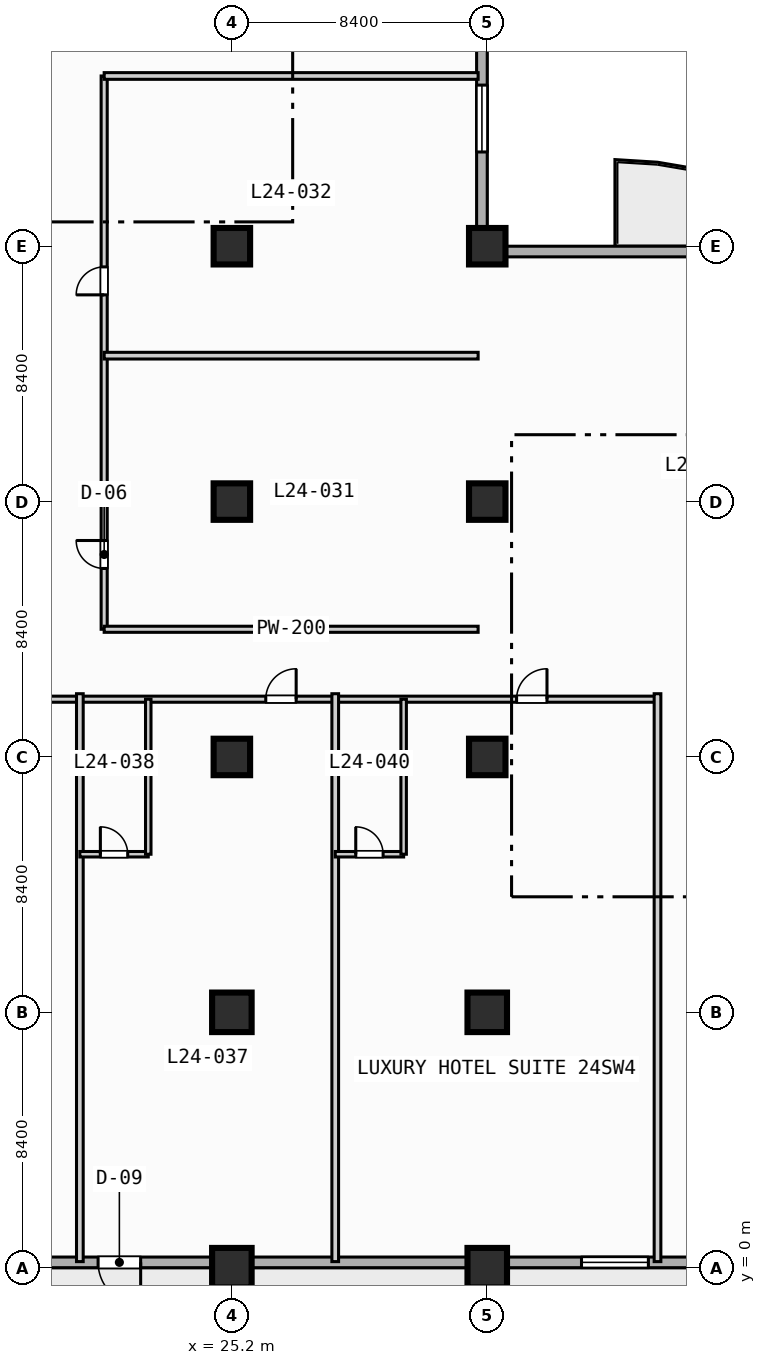
"""IFC4 building model, lengths in metres.
Left out: names, types, materials, properties, quantities, classifications, styles, units other than length and angle.
Written with IfcOpenShell. Run it as: python <this file> out.ifc"""

import sys

from ifc_helpers import new_model, si_unit, direction, frame, frame_2d, origin, origin_2d, place, context, subcontext, project, spatial, rectangle, extrude, element, fill, save


model = new_model("IFC4")
c1 = context("Model", 3, precision=1e-05, world=origin(), true_north=direction((0.0, 1.0)))
c2 = subcontext(c1, "Body", "Model", "MODEL_VIEW")
j1 = project(units=[si_unit("LENGTHUNIT", "METRE"), si_unit("PLANEANGLEUNIT", "RADIAN")], contexts=[c1])
p1 = place(None, origin())
s1 = spatial("IfcSite", under=j1, at=p1, CompositionType="ELEMENT")
p2 = place(p1, origin())
s2 = spatial("IfcBuilding", under=s1, at=p2, CompositionType="ELEMENT")
p3 = place(p2, frame((0.0, 0.0, 103.8)))
s3 = spatial("IfcBuildingStorey", under=s2, at=p3, CompositionType="ELEMENT", Elevation=103.8)
for number, where, z_axis, x_axis in (
    (1, (25.2, 0.0, 0.0), (0.0, 0.0, 1.0), (1.0, 0.0, 0.0)),
    (2, (25.2, 8.4, 0.0), (0.0, 0.0, 1.0), (1.0, 0.0, 0.0)),
):
    element("IfcColumn", number, at=place(p3, frame(where, z_axis=z_axis, x_axis=x_axis)), inside=s3, PredefinedType="COLUMN", context=c2, shape_type="SweptSolid", body=[
        extrude(rectangle(XDim=1.3, YDim=1.3, at=origin_2d()), origin(), (0.0, 0.0, 1.0), 3.8),
    ])
for number, where, z_axis, x_axis in (
    (3, (25.2, 16.8, 0.0), (0.0, 0.0, 1.0), (1.0, 0.0, 0.0)),
    (4, (25.2, 25.2, 0.0), (0.0, 0.0, 1.0), (1.0, 0.0, 0.0)),
    (5, (25.2, 33.6, 0.0), (0.0, 0.0, 1.0), (1.0, 0.0, 0.0)),
):
    element("IfcColumn", number, at=place(p3, frame(where, z_axis=z_axis, x_axis=x_axis)), inside=s3, PredefinedType="COLUMN", context=c2, shape_type="SweptSolid", body=[
        extrude(rectangle(XDim=1.2, YDim=1.2, at=origin_2d()), origin(), (0.0, 0.0, 1.0), 3.8),
    ])
for number, where, z_axis, x_axis in (
    (6, (33.6, 0.0, 0.0), (0.0, 0.0, 1.0), (1.0, 0.0, 0.0)),
    (7, (33.6, 8.4, 0.0), (0.0, 0.0, 1.0), (1.0, 0.0, 0.0)),
):
    element("IfcColumn", number, at=place(p3, frame(where, z_axis=z_axis, x_axis=x_axis)), inside=s3, PredefinedType="COLUMN", context=c2, shape_type="SweptSolid", body=[
        extrude(rectangle(XDim=1.3, YDim=1.3, at=origin_2d()), origin(), (0.0, 0.0, 1.0), 3.8),
    ])
for number, where, z_axis, x_axis in (
    (8, (33.6, 16.8, 0.0), (0.0, 0.0, 1.0), (1.0, 0.0, 0.0)),
    (9, (33.6, 25.2, 0.0), (0.0, 0.0, 1.0), (1.0, 0.0, 0.0)),
    (10, (33.6, 33.6, 0.0), (0.0, 0.0, 1.0), (1.0, 0.0, 0.0)),
):
    element("IfcColumn", number, at=place(p3, frame(where, z_axis=z_axis, x_axis=x_axis)), inside=s3, PredefinedType="COLUMN", context=c2, shape_type="SweptSolid", body=[
        extrude(rectangle(XDim=1.2, YDim=1.2, at=origin_2d()), origin(), (0.0, 0.0, 1.0), 3.8),
    ])
p4 = place(p3, frame((33.425, 89.225, 0.0), z_axis=(0.0, 0.0, 1.0), x_axis=(0.0, -1.0, 0.0)))
e11 = element("IfcWall", 11, at=p4, inside=s3, PredefinedType="STANDARD", context=c2, shape_type="SweptSolid", body=[
    extrude(rectangle(XDim=55.8, YDim=0.35, at=frame_2d((27.9, 0.0))), origin(), (0.0, 0.0, 1.0), 3.55),
])
p5 = place(p4, frame((50.325, 0.0, 0.85)))
e12 = element("IfcOpeningElement", 12, at=p5, cuts=e11, PredefinedType="OPENING", context=c2, shape_type="SweptSolid", body=[
    extrude(rectangle(XDim=2.2, YDim=1.8, at=frame_2d((1.1, 0.9))), frame((0.0, 0.185, 0.0), z_axis=(0.0, -1.0, 0.0), x_axis=(1.0, 0.0, 0.0)), (0.0, 0.0, 1.0), 0.37),
])
p6 = place(p4, frame((33.525, 0.0, 0.85)))
e13 = element("IfcOpeningElement", 13, at=p6, cuts=e11, PredefinedType="OPENING", context=c2, shape_type="SweptSolid", body=[
    extrude(rectangle(XDim=2.2, YDim=1.8, at=frame_2d((1.1, 0.9))), frame((0.0, 0.185, 0.0), z_axis=(0.0, -1.0, 0.0), x_axis=(1.0, 0.0, 0.0)), (0.0, 0.0, 1.0), 0.37),
])
p7 = place(p4, frame((25.125, 0.0, 0.85)))
e14 = element("IfcOpeningElement", 14, at=p7, cuts=e11, PredefinedType="OPENING", context=c2, shape_type="SweptSolid", body=[
    extrude(rectangle(XDim=2.2, YDim=1.8, at=frame_2d((1.1, 0.9))), frame((0.0, 0.185, 0.0), z_axis=(0.0, -1.0, 0.0), x_axis=(1.0, 0.0, 0.0)), (0.0, 0.0, 1.0), 0.37),
])
p8 = place(p4, frame((16.725, 0.0, 0.85)))
e15 = element("IfcOpeningElement", 15, at=p8, cuts=e11, PredefinedType="OPENING", context=c2, shape_type="SweptSolid", body=[
    extrude(rectangle(XDim=2.2, YDim=1.8, at=frame_2d((1.1, 0.9))), frame((0.0, 0.185, 0.0), z_axis=(0.0, -1.0, 0.0), x_axis=(1.0, 0.0, 0.0)), (0.0, 0.0, 1.0), 0.37),
])
p9 = place(p4, frame((8.325, 0.0, 0.85)))
e16 = element("IfcOpeningElement", 16, at=p9, cuts=e11, PredefinedType="OPENING", context=c2, shape_type="SweptSolid", body=[
    extrude(rectangle(XDim=2.2, YDim=1.8, at=frame_2d((1.1, 0.9))), frame((0.0, 0.185, 0.0), z_axis=(0.0, -1.0, 0.0), x_axis=(1.0, 0.0, 0.0)), (0.0, 0.0, 1.0), 0.37),
])
p10 = place(p3, frame((33.425, 33.425, 0.0), z_axis=(0.0, 0.0, 1.0), x_axis=(1.0, 0.0, 0.0)))
e17 = element("IfcWall", 17, at=p10, inside=s3, PredefinedType="STANDARD", context=c2, shape_type="SweptSolid", body=[
    extrude(rectangle(XDim=39.0, YDim=0.35, at=frame_2d((19.5, 0.0))), origin(), (0.0, 0.0, 1.0), 3.55),
])
p11 = place(p10, frame((12.075, 0.0, 0.0)))
e18 = element("IfcOpeningElement", 18, at=p11, cuts=e17, PredefinedType="OPENING", context=c2, shape_type="SweptSolid", body=[
    extrude(rectangle(XDim=1.4, YDim=2.2, at=frame_2d((0.7, 1.1))), frame((0.0, 0.185, 0.0), z_axis=(0.0, -1.0, 0.0), x_axis=(1.0, 0.0, 0.0)), (0.0, 0.0, 1.0), 0.37),
])
p12 = place(p10, frame((20.075, 0.0, 0.85)))
e19 = element("IfcOpeningElement", 19, at=p12, cuts=e17, PredefinedType="OPENING", context=c2, shape_type="SweptSolid", body=[
    extrude(rectangle(XDim=2.2, YDim=1.8, at=frame_2d((1.1, 0.9))), frame((0.0, 0.185, 0.0), z_axis=(0.0, -1.0, 0.0), x_axis=(1.0, 0.0, 0.0)), (0.0, 0.0, 1.0), 0.37),
])
p13 = place(p10, frame((28.475, 0.0, 0.85)))
e20 = element("IfcOpeningElement", 20, at=p13, cuts=e17, PredefinedType="OPENING", context=c2, shape_type="SweptSolid", body=[
    extrude(rectangle(XDim=2.2, YDim=1.8, at=frame_2d((1.1, 0.9))), frame((0.0, 0.185, 0.0), z_axis=(0.0, -1.0, 0.0), x_axis=(1.0, 0.0, 0.0)), (0.0, 0.0, 1.0), 0.37),
])
p14 = place(p3, frame((72.425, 0.175, 0.0), z_axis=(0.0, 0.0, 1.0), x_axis=(-1.0, 0.0, 0.0)))
e21 = element("IfcWall", 21, at=p14, inside=s3, PredefinedType="STANDARD", context=c2, shape_type="SweptSolid", body=[
    extrude(rectangle(XDim=69.25, YDim=0.35, at=frame_2d((34.625, 0.0))), origin(), (0.0, 0.0, 1.0), 3.55),
])
p15 = place(p14, frame((50.225, 0.0, 0.0)))
e22 = element("IfcOpeningElement", 22, at=p15, cuts=e21, PredefinedType="OPENING", context=c2, shape_type="SweptSolid", body=[
    extrude(rectangle(XDim=1.4, YDim=2.2, at=frame_2d((0.7, 1.1))), frame((0.0, 0.185, 0.0), z_axis=(0.0, -1.0, 0.0), x_axis=(1.0, 0.0, 0.0)), (0.0, 0.0, 1.0), 0.37),
])
p16 = place(p14, frame((33.525, 0.0, 0.85)))
e23 = element("IfcOpeningElement", 23, at=p16, cuts=e21, PredefinedType="OPENING", context=c2, shape_type="SweptSolid", body=[
    extrude(rectangle(XDim=2.2, YDim=1.8, at=frame_2d((1.1, 0.9))), frame((0.0, 0.185, 0.0), z_axis=(0.0, -1.0, 0.0), x_axis=(1.0, 0.0, 0.0)), (0.0, 0.0, 1.0), 0.37),
])
p17 = place(p14, frame((25.125, 0.0, 0.85)))
e24 = element("IfcOpeningElement", 24, at=p17, cuts=e21, PredefinedType="OPENING", context=c2, shape_type="SweptSolid", body=[
    extrude(rectangle(XDim=2.2, YDim=1.8, at=frame_2d((1.1, 0.9))), frame((0.0, 0.185, 0.0), z_axis=(0.0, -1.0, 0.0), x_axis=(1.0, 0.0, 0.0)), (0.0, 0.0, 1.0), 0.37),
])
p18 = place(p14, frame((8.325, 0.0, 0.85)))
e25 = element("IfcOpeningElement", 25, at=p18, cuts=e21, PredefinedType="OPENING", context=c2, shape_type="SweptSolid", body=[
    extrude(rectangle(XDim=2.2, YDim=1.8, at=frame_2d((1.1, 0.9))), frame((0.0, 0.185, 0.0), z_axis=(0.0, -1.0, 0.0), x_axis=(1.0, 0.0, 0.0)), (0.0, 0.0, 1.0), 0.37),
])
p19 = place(p14, frame((64.925, 0.0, 0.85)))
e26 = element("IfcOpeningElement", 26, at=p19, cuts=e21, PredefinedType="OPENING", context=c2, shape_type="SweptSolid", body=[
    extrude(rectangle(XDim=1.8, YDim=1.8, at=frame_2d((0.9, 0.9))), frame((0.0, 0.185, 0.0), z_axis=(0.0, -1.0, 0.0), x_axis=(1.0, 0.0, 0.0)), (0.0, 0.0, 1.0), 0.37),
])
p20 = place(p14, frame((56.525, 0.0, 0.85)))
e27 = element("IfcOpeningElement", 27, at=p20, cuts=e21, PredefinedType="OPENING", context=c2, shape_type="SweptSolid", body=[
    extrude(rectangle(XDim=1.8, YDim=1.8, at=frame_2d((0.9, 0.9))), frame((0.0, 0.185, 0.0), z_axis=(0.0, -1.0, 0.0), x_axis=(1.0, 0.0, 0.0)), (0.0, 0.0, 1.0), 0.37),
])
p21 = place(p14, frame((2.125, 0.0, 0.85)))
e28 = element("IfcOpeningElement", 28, at=p21, cuts=e21, PredefinedType="OPENING", context=c2, shape_type="SweptSolid", body=[
    extrude(rectangle(XDim=1.8, YDim=1.8, at=frame_2d((0.9, 0.9))), frame((0.0, 0.185, 0.0), z_axis=(0.0, -1.0, 0.0), x_axis=(1.0, 0.0, 0.0)), (0.0, 0.0, 1.0), 0.37),
])
p22 = place(p3, frame((21.0, 21.0, 0.0), z_axis=(0.0, 0.0, 1.0), x_axis=(0.0, 1.0, 0.0)))
e29 = element("IfcWall", 29, at=p22, inside=s3, PredefinedType="PARTITIONING", context=c2, shape_type="SweptSolid", body=[
    extrude(rectangle(XDim=18.2, YDim=0.2, at=frame_2d((9.1, 0.0))), origin(), (0.0, 0.0, 1.0), 3.55),
])
p23 = place(p22, frame((2.0, 0.0, 0.0)))
e30 = element("IfcOpeningElement", 30, at=p23, cuts=e29, PredefinedType="OPENING", context=c2, shape_type="SweptSolid", body=[
    extrude(rectangle(XDim=0.92, YDim=2.1, at=frame_2d((0.46, 1.05))), frame((0.0, 0.11, 0.0), z_axis=(0.0, -1.0, 0.0), x_axis=(1.0, 0.0, 0.0)), (0.0, 0.0, 1.0), 0.22),
])
p24 = place(p22, frame((11.0, 0.0, 0.0)))
e31 = element("IfcOpeningElement", 31, at=p24, cuts=e29, PredefinedType="OPENING", context=c2, shape_type="SweptSolid", body=[
    extrude(rectangle(XDim=0.92, YDim=2.1, at=frame_2d((0.46, 1.05))), frame((0.0, 0.11, 0.0), z_axis=(0.0, -1.0, 0.0), x_axis=(1.0, 0.0, 0.0)), (0.0, 0.0, 1.0), 0.22),
])
p25 = place(p3, frame((21.0, 21.0, 0.0), z_axis=(0.0, 0.0, 1.0), x_axis=(1.0, 0.0, 0.0)))
e32 = element("IfcWall", 32, at=p25, inside=s3, PredefinedType="PARTITIONING", context=c2, shape_type="SweptSolid", body=[
    extrude(rectangle(XDim=12.3, YDim=0.2, at=frame_2d((6.15, 0.0))), origin(), (0.0, 0.0, 1.0), 3.55),
])
for number, where, z_axis, x_axis in (
    (33, (21.0, 30.0, 0.0), (0.0, 0.0, 1.0), (1.0, 0.0, 0.0)),
    (34, (21.0, 39.2, 0.0), (0.0, 0.0, 1.0), (1.0, 0.0, 0.0)),
):
    element("IfcWall", number, at=place(p3, frame(where, z_axis=z_axis, x_axis=x_axis)), inside=s3, PredefinedType="PARTITIONING", context=c2, shape_type="SweptSolid", body=[
        extrude(rectangle(XDim=12.3, YDim=0.22, at=frame_2d((6.15, 0.0))), origin(), (0.0, 0.0, 1.0), 3.55),
    ])
p26 = place(p3, frame((3.4, 18.7, 0.0), z_axis=(0.0, 0.0, 1.0), x_axis=(1.0, 0.0, 0.0)))
e35 = element("IfcWall", 35, at=p26, inside=s3, PredefinedType="PARTITIONING", context=c2, shape_type="SweptSolid", body=[
    extrude(rectangle(XDim=35.8, YDim=0.2, at=frame_2d((17.9, 0.0))), origin(), (0.0, 0.0, 1.0), 3.55),
])
p27 = place(p26, frame((6.115, 0.0, 0.0)))
e36 = element("IfcOpeningElement", 36, at=p27, cuts=e35, PredefinedType="OPENING", context=c2, shape_type="SweptSolid", body=[
    extrude(rectangle(XDim=1.0, YDim=2.15, at=frame_2d((0.5, 1.075))), frame((0.0, 0.11, 0.0), z_axis=(0.0, -1.0, 0.0), x_axis=(1.0, 0.0, 0.0)), (0.0, 0.0, 1.0), 0.22),
])
p28 = place(p26, frame((14.515, 0.0, 0.0)))
e37 = element("IfcOpeningElement", 37, at=p28, cuts=e35, PredefinedType="OPENING", context=c2, shape_type="SweptSolid", body=[
    extrude(rectangle(XDim=1.0, YDim=2.15, at=frame_2d((0.5, 1.075))), frame((0.0, 0.11, 0.0), z_axis=(0.0, -1.0, 0.0), x_axis=(1.0, 0.0, 0.0)), (0.0, 0.0, 1.0), 0.22),
])
p29 = place(p26, frame((22.915, 0.0, 0.0)))
e38 = element("IfcOpeningElement", 38, at=p29, cuts=e35, PredefinedType="OPENING", context=c2, shape_type="SweptSolid", body=[
    extrude(rectangle(XDim=1.0, YDim=2.15, at=frame_2d((0.5, 1.075))), frame((0.0, 0.11, 0.0), z_axis=(0.0, -1.0, 0.0), x_axis=(1.0, 0.0, 0.0)), (0.0, 0.0, 1.0), 0.22),
])
p30 = place(p26, frame((31.165, 0.0, 0.0)))
e39 = element("IfcOpeningElement", 39, at=p30, cuts=e35, PredefinedType="OPENING", context=c2, shape_type="SweptSolid", body=[
    extrude(rectangle(XDim=1.0, YDim=2.15, at=frame_2d((0.5, 1.075))), frame((0.0, 0.11, 0.0), z_axis=(0.0, -1.0, 0.0), x_axis=(1.0, 0.0, 0.0)), (0.0, 0.0, 1.0), 0.22),
])
p31 = place(p3, frame((20.2, 0.2, 0.0), z_axis=(0.0, 0.0, 1.0), x_axis=(0.0, 1.0, 0.0)))
e40 = element("IfcWall", 40, at=p31, inside=s3, PredefinedType="PARTITIONING", context=c2, shape_type="SweptSolid", body=[
    extrude(rectangle(XDim=18.68, YDim=0.22, at=frame_2d((9.34, 0.0))), origin(), (0.0, 0.0, 1.0), 3.55),
])
p32 = place(p3, frame((20.2, 13.6, 0.0), z_axis=(0.0, 0.0, 1.0), x_axis=(1.0, 0.0, 0.0)))
e41 = element("IfcWall", 41, at=p32, inside=s3, PredefinedType="PLUMBINGWALL", context=c2, shape_type="SweptSolid", body=[
    extrude(rectangle(XDim=2.25, YDim=0.18, at=frame_2d((1.125, 0.0))), origin(), (0.0, 0.0, 1.0), 3.55),
])
p33 = place(p32, frame((0.675, 0.0, 0.0)))
e42 = element("IfcOpeningElement", 42, at=p33, cuts=e41, PredefinedType="OPENING", context=c2, shape_type="SweptSolid", body=[
    extrude(rectangle(XDim=0.9, YDim=2.1, at=frame_2d((0.45, 1.05))), frame((0.0, 0.1, 0.0), z_axis=(0.0, -1.0, 0.0), x_axis=(1.0, 0.0, 0.0)), (0.0, 0.0, 1.0), 0.2),
])
p34 = place(p3, frame((22.45, 13.6, 0.0), z_axis=(0.0, 0.0, 1.0), x_axis=(0.0, 1.0, 0.0)))
e43 = element("IfcWall", 43, at=p34, inside=s3, PredefinedType="PLUMBINGWALL", context=c2, shape_type="SweptSolid", body=[
    extrude(rectangle(XDim=5.1, YDim=0.18, at=frame_2d((2.55, 0.0))), origin(), (0.0, 0.0, 1.0), 3.55),
])
for number, where, z_axis, x_axis in (
    (44, (28.6, 0.2, 0.0), (0.0, 0.0, 1.0), (0.0, 1.0, 0.0)),
    (45, (39.2, 0.2, 0.0), (0.0, 0.0, 1.0), (0.0, 1.0, 0.0)),
):
    element("IfcWall", number, at=place(p3, frame(where, z_axis=z_axis, x_axis=x_axis)), inside=s3, PredefinedType="PARTITIONING", context=c2, shape_type="SweptSolid", body=[
        extrude(rectangle(XDim=18.68, YDim=0.22, at=frame_2d((9.34, 0.0))), origin(), (0.0, 0.0, 1.0), 3.55),
    ])
p35 = place(p3, frame((28.6, 13.6, 0.0), z_axis=(0.0, 0.0, 1.0), x_axis=(1.0, 0.0, 0.0)))
e46 = element("IfcWall", 46, at=p35, inside=s3, PredefinedType="PLUMBINGWALL", context=c2, shape_type="SweptSolid", body=[
    extrude(rectangle(XDim=2.25, YDim=0.18, at=frame_2d((1.125, 0.0))), origin(), (0.0, 0.0, 1.0), 3.55),
])
p36 = place(p35, frame((0.675, 0.0, 0.0)))
e47 = element("IfcOpeningElement", 47, at=p36, cuts=e46, PredefinedType="OPENING", context=c2, shape_type="SweptSolid", body=[
    extrude(rectangle(XDim=0.9, YDim=2.1, at=frame_2d((0.45, 1.05))), frame((0.0, 0.1, 0.0), z_axis=(0.0, -1.0, 0.0), x_axis=(1.0, 0.0, 0.0)), (0.0, 0.0, 1.0), 0.2),
])
p37 = place(p3, frame((30.85, 13.6, 0.0), z_axis=(0.0, 0.0, 1.0), x_axis=(0.0, 1.0, 0.0)))
e48 = element("IfcWall", 48, at=p37, inside=s3, PredefinedType="PLUMBINGWALL", context=c2, shape_type="SweptSolid", body=[
    extrude(rectangle(XDim=5.1, YDim=0.18, at=frame_2d((2.55, 0.0))), origin(), (0.0, 0.0, 1.0), 3.55),
])
p38 = place(p5, origin())
e49 = element("IfcWindow", 49, at=p38, inside=s3, PartitioningType="SINGLE_PANEL", PredefinedType="WINDOW", context=c2, shape_type="SweptSolid", body=[
    extrude(rectangle(XDim=2.2, YDim=1.8, at=frame_2d((1.1, 0.9))), frame((0.0, 0.03, 0.0), z_axis=(0.0, -1.0, 0.0), x_axis=(1.0, 0.0, 0.0)), (0.0, 0.0, 1.0), 0.06),
])
fill(e12, e49)
p39 = place(p15, origin())
e50 = element("IfcDoor", 50, at=p39, inside=s3, OperationType="SINGLE_SWING_LEFT", PredefinedType="DOOR", context=c2, shape_type="SweptSolid", body=[
    extrude(rectangle(XDim=1.4, YDim=2.2, at=frame_2d((0.7, 1.1))), frame((0.0, 0.025, 0.0), z_axis=(0.0, -1.0, 0.0), x_axis=(1.0, 0.0, 0.0)), (0.0, 0.0, 1.0), 0.05),
])
fill(e22, e50)
p40 = place(p16, origin())
e51 = element("IfcWindow", 51, at=p40, inside=s3, PartitioningType="SINGLE_PANEL", PredefinedType="WINDOW", context=c2, shape_type="SweptSolid", body=[
    extrude(rectangle(XDim=2.2, YDim=1.8, at=frame_2d((1.1, 0.9))), frame((0.0, 0.03, 0.0), z_axis=(0.0, -1.0, 0.0), x_axis=(1.0, 0.0, 0.0)), (0.0, 0.0, 1.0), 0.06),
])
fill(e23, e51)
p41 = place(p23, origin())
e52 = element("IfcDoor", 52, at=p41, inside=s3, OperationType="SINGLE_SWING_RIGHT", PredefinedType="DOOR", context=c2, shape_type="SweptSolid", body=[
    extrude(rectangle(XDim=0.92, YDim=2.1, at=frame_2d((0.46, 1.05))), frame((0.0, 0.025, 0.0), z_axis=(0.0, -1.0, 0.0), x_axis=(1.0, 0.0, 0.0)), (0.0, 0.0, 1.0), 0.05),
])
fill(e30, e52)
p42 = place(p24, origin())
e53 = element("IfcDoor", 53, at=p42, inside=s3, OperationType="SINGLE_SWING_LEFT", PredefinedType="DOOR", context=c2, shape_type="SweptSolid", body=[
    extrude(rectangle(XDim=0.92, YDim=2.1, at=frame_2d((0.46, 1.05))), frame((0.0, 0.025, 0.0), z_axis=(0.0, -1.0, 0.0), x_axis=(1.0, 0.0, 0.0)), (0.0, 0.0, 1.0), 0.05),
])
fill(e31, e53)
p43 = place(p29, origin())
e54 = element("IfcDoor", 54, at=p43, inside=s3, OperationType="SINGLE_SWING_RIGHT", PredefinedType="DOOR", context=c2, shape_type="SweptSolid", body=[
    extrude(rectangle(XDim=1.0, YDim=2.15, at=frame_2d((0.5, 1.075))), frame((0.0, 0.025, 0.0), z_axis=(0.0, -1.0, 0.0), x_axis=(1.0, 0.0, 0.0)), (0.0, 0.0, 1.0), 0.05),
])
fill(e38, e54)
p44 = place(p30, origin())
e55 = element("IfcDoor", 55, at=p44, inside=s3, OperationType="SINGLE_SWING_RIGHT", PredefinedType="DOOR", context=c2, shape_type="SweptSolid", body=[
    extrude(rectangle(XDim=1.0, YDim=2.15, at=frame_2d((0.5, 1.075))), frame((0.0, 0.025, 0.0), z_axis=(0.0, -1.0, 0.0), x_axis=(1.0, 0.0, 0.0)), (0.0, 0.0, 1.0), 0.05),
])
fill(e39, e55)
p45 = place(p33, origin())
e56 = element("IfcDoor", 56, at=p45, inside=s3, OperationType="SINGLE_SWING_LEFT", PredefinedType="DOOR", context=c2, shape_type="SweptSolid", body=[
    extrude(rectangle(XDim=0.9, YDim=2.1, at=frame_2d((0.45, 1.05))), frame((0.0, 0.025, 0.0), z_axis=(0.0, -1.0, 0.0), x_axis=(1.0, 0.0, 0.0)), (0.0, 0.0, 1.0), 0.05),
])
fill(e42, e56)
p46 = place(p36, origin())
e57 = element("IfcDoor", 57, at=p46, inside=s3, OperationType="SINGLE_SWING_LEFT", PredefinedType="DOOR", context=c2, shape_type="SweptSolid", body=[
    extrude(rectangle(XDim=0.9, YDim=2.1, at=frame_2d((0.45, 1.05))), frame((0.0, 0.025, 0.0), z_axis=(0.0, -1.0, 0.0), x_axis=(1.0, 0.0, 0.0)), (0.0, 0.0, 1.0), 0.05),
])
fill(e47, e57)
save(model, sys.argv[1])
